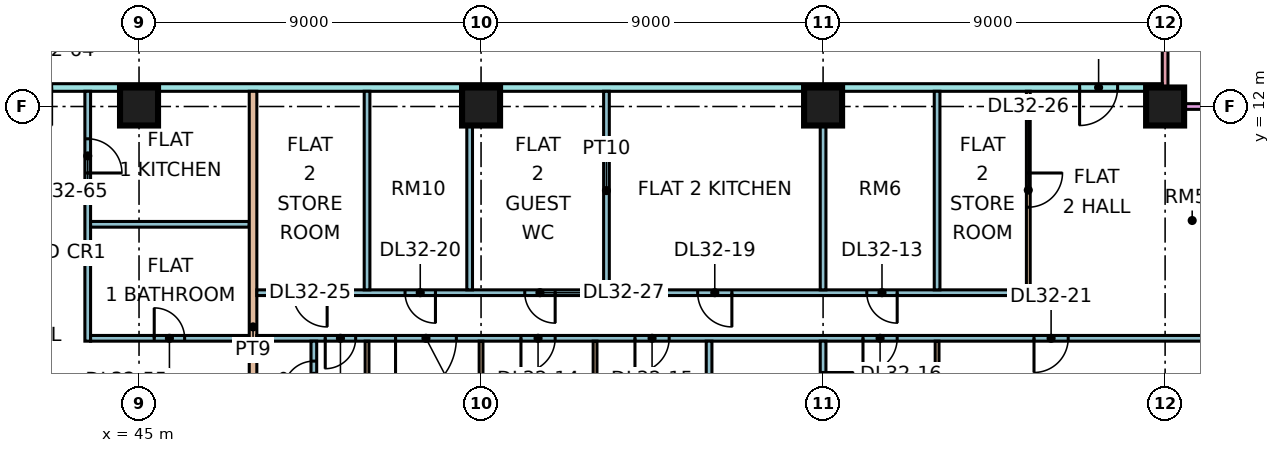
"""IFC4 building model, lengths in metres.
Left out: names, types, materials, properties, quantities, classifications, styles, units other than length and angle.
Written with IfcOpenShell. Run it as: python <this file> out.ifc"""

import sys

from ifc_helpers import new_model, si_unit, direction, frame, frame_2d, origin, origin_2d, place, context, subcontext, project, spatial, rectangle, extrude, element, fill, save


model = new_model("IFC4")
c1 = context("Model", 3, precision=1e-05, world=origin(), true_north=direction((0.0, 1.0)))
c2 = subcontext(c1, "Body", "Model", "MODEL_VIEW")
j1 = project(units=[si_unit("LENGTHUNIT", "METRE"), si_unit("PLANEANGLEUNIT", "RADIAN")], contexts=[c1])
p1 = place(None, origin())
s1 = spatial("IfcSite", under=j1, at=p1, CompositionType="ELEMENT")
p2 = place(p1, origin())
s2 = spatial("IfcBuilding", under=s1, at=p2, CompositionType="ELEMENT")
p3 = place(p2, frame((0.0, 0.0, 136.9)))
s3 = spatial("IfcBuildingStorey", under=s2, at=p3, CompositionType="ELEMENT", Elevation=136.9)
for number, where, z_axis, x_axis in (
    (1, (45.0, 12.0, 0.0), (0.0, 0.0, 1.0), (1.0, 0.0, 0.0)),
    (2, (54.0, 12.0, 0.0), (0.0, 0.0, 1.0), (1.0, 0.0, 0.0)),
    (3, (63.0, 12.0, 0.0), (0.0, 0.0, 1.0), (1.0, 0.0, 0.0)),
    (4, (72.0, 12.0, 0.0), (0.0, 0.0, 1.0), (1.0, 0.0, 0.0)),
):
    element("IfcColumn", number, at=place(p3, frame(where, z_axis=z_axis, x_axis=x_axis)), inside=s3, PredefinedType="COLUMN", context=c2, shape_type="SweptSolid", body=[
        extrude(rectangle(XDim=1.0, YDim=1.0, at=origin_2d()), origin(), (0.0, 0.0, 1.0), 3.75),
    ])
p4 = place(p3, frame((72.0, 12.075, 0.0), z_axis=(0.0, 0.0, 1.0), x_axis=(0.0, 1.0, 0.0)))
e5 = element("IfcWall", 5, at=p4, inside=s3, PredefinedType="SOLIDWALL", context=c2, shape_type="SweptSolid", body=[
    extrude(rectangle(XDim=10.35, YDim=0.15, at=frame_2d((5.175, 0.0))), origin(), (0.0, 0.0, 1.0), 3.3),
])
p5 = place(p4, frame((4.275, 0.0, 1.7)))
e6 = element("IfcOpeningElement", 6, at=p5, cuts=e5, PredefinedType="OPENING", context=c2, shape_type="SweptSolid", body=[
    extrude(rectangle(XDim=1.2, YDim=0.9, at=frame_2d((0.6, 0.45))), frame((0.0, 0.085, 0.0), z_axis=(0.0, -1.0, 0.0), x_axis=(1.0, 0.0, 0.0)), (0.0, 0.0, 1.0), 0.17),
])
p6 = place(p4, frame((7.988, 0.0, 0.45)))
e7 = element("IfcOpeningElement", 7, at=p6, cuts=e5, PredefinedType="OPENING", context=c2, shape_type="SweptSolid", body=[
    extrude(rectangle(XDim=1.8, YDim=2.4, at=frame_2d((0.9, 1.2))), frame((0.0, 0.085, 0.0), z_axis=(0.0, -1.0, 0.0), x_axis=(1.0, 0.0, 0.0)), (0.0, 0.0, 1.0), 0.17),
])
p7 = place(p3, frame((73.5, 12.0, 0.0), z_axis=(0.0, 0.0, 1.0), x_axis=(-1.0, 0.0, 0.0)))
e8 = element("IfcWall", 8, at=p7, inside=s3, PredefinedType="SOLIDWALL", context=c2, shape_type="SweptSolid", body=[
    extrude(rectangle(XDim=1.5, YDim=0.15, at=frame_2d((0.75, 0.0))), origin(), (0.0, 0.0, 1.0), 3.3),
])
p8 = place(p3, frame((40.65, 12.5, 0.0), z_axis=(0.0, 0.0, 1.0), x_axis=(1.0, 0.0, 0.0)))
e9 = element("IfcWall", 9, at=p8, inside=s3, PredefinedType="PARTITIONING", context=c2, shape_type="SweptSolid", body=[
    extrude(rectangle(XDim=31.276, YDim=0.2, at=frame_2d((15.638, 0.0))), origin(), (0.0, 0.0, 1.0), 3.3),
])
p9 = place(p8, frame((29.1, 0.0, 0.0)))
e10 = element("IfcOpeningElement", 10, at=p9, cuts=e9, PredefinedType="OPENING", context=c2, shape_type="SweptSolid", body=[
    extrude(rectangle(XDim=1.0, YDim=2.1, at=frame_2d((0.5, 1.05))), frame((0.0, 0.11, 0.0), z_axis=(0.0, -1.0, 0.0), x_axis=(1.0, 0.0, 0.0)), (0.0, 0.0, 1.0), 0.22),
])
p10 = place(p8, frame((1.05, 0.0, 0.0)))
e11 = element("IfcOpeningElement", 11, at=p10, cuts=e9, PredefinedType="OPENING", context=c2, shape_type="SweptSolid", body=[
    extrude(rectangle(XDim=1.0, YDim=2.1, at=frame_2d((0.5, 1.05))), frame((0.0, 0.11, 0.0), z_axis=(0.0, -1.0, 0.0), x_axis=(1.0, 0.0, 0.0)), (0.0, 0.0, 1.0), 0.22),
])
p11 = place(p3, frame((43.65, 5.825, 0.0), z_axis=(0.0, 0.0, 1.0), x_axis=(0.0, 1.0, 0.0)))
e12 = element("IfcWall", 12, at=p11, inside=s3, PredefinedType="PARTITIONING", context=c2, shape_type="SweptSolid", body=[
    extrude(rectangle(XDim=6.575, YDim=0.15, at=frame_2d((3.288, 0.0))), origin(), (0.0, 0.0, 1.0), 3.3),
])
p12 = place(p11, frame((4.425, 0.0, 0.0)))
e13 = element("IfcOpeningElement", 13, at=p12, cuts=e12, PredefinedType="OPENING", context=c2, shape_type="SweptSolid", body=[
    extrude(rectangle(XDim=0.9, YDim=2.1, at=frame_2d((0.45, 1.05))), frame((0.0, 0.085, 0.0), z_axis=(0.0, -1.0, 0.0), x_axis=(1.0, 0.0, 0.0)), (0.0, 0.0, 1.0), 0.17),
])
p13 = place(p3, frame((43.725, 5.9, 0.0), z_axis=(0.0, 0.0, 1.0), x_axis=(1.0, 0.0, 0.0)))
e14 = element("IfcWall", 14, at=p13, inside=s3, PredefinedType="PARTITIONING", context=c2, shape_type="SweptSolid", body=[
    extrude(rectangle(XDim=4.175, YDim=0.15, at=frame_2d((2.087, 0.0))), origin(), (0.0, 0.0, 1.0), 3.3),
])
p14 = place(p13, frame((1.675, 0.0, 0.0)))
e15 = element("IfcOpeningElement", 15, at=p14, cuts=e14, PredefinedType="OPENING", context=c2, shape_type="SweptSolid", body=[
    extrude(rectangle(XDim=0.8, YDim=2.1, at=frame_2d((0.4, 1.05))), frame((0.0, 0.085, 0.0), z_axis=(0.0, -1.0, 0.0), x_axis=(1.0, 0.0, 0.0)), (0.0, 0.0, 1.0), 0.17),
])
p15 = place(p3, frame((43.725, 8.9, 0.0), z_axis=(0.0, 0.0, 1.0), x_axis=(1.0, 0.0, 0.0)))
e16 = element("IfcWall", 16, at=p15, inside=s3, PredefinedType="PARTITIONING", context=c2, shape_type="SweptSolid", body=[
    extrude(rectangle(XDim=4.175, YDim=0.15, at=frame_2d((2.087, 0.0))), origin(), (0.0, 0.0, 1.0), 3.3),
])
p16 = place(p3, frame((48.0, 0.0, 0.0), z_axis=(0.0, 0.0, 1.0), x_axis=(0.0, 1.0, 0.0)))
e17 = element("IfcWall", 17, at=p16, inside=s3, PredefinedType="PARTITIONING", context=c2, shape_type="SweptSolid", body=[
    extrude(rectangle(XDim=12.4, YDim=0.2, at=frame_2d((6.2, 0.0))), origin(), (0.0, 0.0, 1.0), 3.3),
])
p17 = place(p3, frame((48.1, 5.9, 0.0), z_axis=(0.0, 0.0, 1.0), x_axis=(1.0, 0.0, 0.0)))
e18 = element("IfcWall", 18, at=p17, inside=s3, PredefinedType="PARTITIONING", context=c2, shape_type="SweptSolid", body=[
    extrude(rectangle(XDim=25.25, YDim=0.15, at=frame_2d((12.625, 0.0))), origin(), (0.0, 0.0, 1.0), 3.3),
])
p18 = place(p17, frame((6.95, 0.0, 0.0)))
e19 = element("IfcOpeningElement", 19, at=p18, cuts=e18, PredefinedType="OPENING", context=c2, shape_type="SweptSolid", body=[
    extrude(rectangle(XDim=0.9, YDim=2.1, at=frame_2d((0.45, 1.05))), frame((0.0, 0.085, 0.0), z_axis=(0.0, -1.0, 0.0), x_axis=(1.0, 0.0, 0.0)), (0.0, 0.0, 1.0), 0.17),
])
p19 = place(p17, frame((9.95, 0.0, 0.0)))
e20 = element("IfcOpeningElement", 20, at=p19, cuts=e18, PredefinedType="OPENING", context=c2, shape_type="SweptSolid", body=[
    extrude(rectangle(XDim=0.9, YDim=2.1, at=frame_2d((0.45, 1.05))), frame((0.0, 0.085, 0.0), z_axis=(0.0, -1.0, 0.0), x_axis=(1.0, 0.0, 0.0)), (0.0, 0.0, 1.0), 0.17),
])
p20 = place(p17, frame((15.95, 0.0, 0.0)))
e21 = element("IfcOpeningElement", 21, at=p20, cuts=e18, PredefinedType="OPENING", context=c2, shape_type="SweptSolid", body=[
    extrude(rectangle(XDim=0.9, YDim=2.1, at=frame_2d((0.45, 1.05))), frame((0.0, 0.085, 0.0), z_axis=(0.0, -1.0, 0.0), x_axis=(1.0, 0.0, 0.0)), (0.0, 0.0, 1.0), 0.17),
])
p21 = place(p17, frame((20.45, 0.0, 0.0)))
e22 = element("IfcOpeningElement", 22, at=p21, cuts=e18, PredefinedType="OPENING", context=c2, shape_type="SweptSolid", body=[
    extrude(rectangle(XDim=0.9, YDim=2.1, at=frame_2d((0.45, 1.05))), frame((0.0, 0.085, 0.0), z_axis=(0.0, -1.0, 0.0), x_axis=(1.0, 0.0, 0.0)), (0.0, 0.0, 1.0), 0.17),
])
p22 = place(p17, frame((1.8, 0.0, 0.0)))
e23 = element("IfcOpeningElement", 23, at=p22, cuts=e18, PredefinedType="OPENING", context=c2, shape_type="SweptSolid", body=[
    extrude(rectangle(XDim=0.8, YDim=2.1, at=frame_2d((0.4, 1.05))), frame((0.0, 0.085, 0.0), z_axis=(0.0, -1.0, 0.0), x_axis=(1.0, 0.0, 0.0)), (0.0, 0.0, 1.0), 0.17),
])
p23 = place(p17, frame((3.65, 0.0, 0.0)))
e24 = element("IfcOpeningElement", 24, at=p23, cuts=e18, PredefinedType="OPENING", context=c2, shape_type="SweptSolid", body=[
    extrude(rectangle(XDim=1.6, YDim=2.1, at=frame_2d((0.8, 1.05))), frame((0.0, 0.085, 0.0), z_axis=(0.0, -1.0, 0.0), x_axis=(1.0, 0.0, 0.0)), (0.0, 0.0, 1.0), 0.17),
])
p24 = place(p3, frame((48.1, 7.1, 0.0), z_axis=(0.0, 0.0, 1.0), x_axis=(1.0, 0.0, 0.0)))
e25 = element("IfcWall", 25, at=p24, inside=s3, PredefinedType="PARTITIONING", context=c2, shape_type="SweptSolid", body=[
    extrude(rectangle(XDim=20.35, YDim=0.15, at=frame_2d((10.175, 0.0))), origin(), (0.0, 0.0, 1.0), 3.3),
])
p25 = place(p24, frame((16.05, 0.0, 0.0)))
e26 = element("IfcOpeningElement", 26, at=p25, cuts=e25, PredefinedType="OPENING", context=c2, shape_type="SweptSolid", body=[
    extrude(rectangle(XDim=0.8, YDim=2.1, at=frame_2d((0.4, 1.05))), frame((0.0, 0.085, 0.0), z_axis=(0.0, -1.0, 0.0), x_axis=(1.0, 0.0, 0.0)), (0.0, 0.0, 1.0), 0.17),
])
p26 = place(p24, frame((11.6, 0.0, 0.0)))
e27 = element("IfcOpeningElement", 27, at=p26, cuts=e25, PredefinedType="OPENING", context=c2, shape_type="SweptSolid", body=[
    extrude(rectangle(XDim=0.9, YDim=2.1, at=frame_2d((0.45, 1.05))), frame((0.0, 0.085, 0.0), z_axis=(0.0, -1.0, 0.0), x_axis=(1.0, 0.0, 0.0)), (0.0, 0.0, 1.0), 0.17),
])
p27 = place(p24, frame((3.9, 0.0, 0.0)))
e28 = element("IfcOpeningElement", 28, at=p27, cuts=e25, PredefinedType="OPENING", context=c2, shape_type="SweptSolid", body=[
    extrude(rectangle(XDim=0.8, YDim=2.1, at=frame_2d((0.4, 1.05))), frame((0.0, 0.085, 0.0), z_axis=(0.0, -1.0, 0.0), x_axis=(1.0, 0.0, 0.0)), (0.0, 0.0, 1.0), 0.17),
])
p28 = place(p24, frame((0.95, 0.0, 0.0)))
e29 = element("IfcOpeningElement", 29, at=p28, cuts=e25, PredefinedType="OPENING", context=c2, shape_type="SweptSolid", body=[
    extrude(rectangle(XDim=0.9, YDim=2.1, at=frame_2d((0.45, 1.05))), frame((0.0, 0.085, 0.0), z_axis=(0.0, -1.0, 0.0), x_axis=(1.0, 0.0, 0.0)), (0.0, 0.0, 1.0), 0.17),
])
p29 = place(p24, frame((7.05, 0.0, 0.0)))
e30 = element("IfcOpeningElement", 30, at=p29, cuts=e25, PredefinedType="OPENING", context=c2, shape_type="SweptSolid", body=[
    extrude(rectangle(XDim=0.8, YDim=2.1, at=frame_2d((0.4, 1.05))), frame((0.0, 0.085, 0.0), z_axis=(0.0, -1.0, 0.0), x_axis=(1.0, 0.0, 0.0)), (0.0, 0.0, 1.0), 0.17),
])
p30 = place(p3, frame((49.6, 3.825, 0.0), z_axis=(0.0, 0.0, 1.0), x_axis=(0.0, 1.0, 0.0)))
e31 = element("IfcWall", 31, at=p30, inside=s3, PredefinedType="PARTITIONING", context=c2, shape_type="SweptSolid", body=[
    extrude(rectangle(XDim=2.0, YDim=0.15, at=frame_2d((1.0, 0.0))), origin(), (0.0, 0.0, 1.0), 3.3),
])
p31 = place(p30, frame((0.675, 0.0, 0.0)))
e32 = element("IfcOpeningElement", 32, at=p31, cuts=e31, PredefinedType="OPENING", context=c2, shape_type="SweptSolid", body=[
    extrude(rectangle(XDim=0.8, YDim=2.1, at=frame_2d((0.4, 1.05))), frame((0.0, 0.085, 0.0), z_axis=(0.0, -1.0, 0.0), x_axis=(1.0, 0.0, 0.0)), (0.0, 0.0, 1.0), 0.17),
])
p32 = place(p3, frame((51.0, -1.351, 0.0), z_axis=(0.0, 0.0, 1.0), x_axis=(0.0, 1.0, 0.0)))
e33 = element("IfcWall", 33, at=p32, inside=s3, PredefinedType="PARTITIONING", context=c2, shape_type="SweptSolid", body=[
    extrude(rectangle(XDim=7.176, YDim=0.1, at=frame_2d((3.588, 0.0))), origin(), (0.0, 0.0, 1.0), 3.3),
])
for number, where, z_axis, x_axis in (
    (34, (51.0, 7.175, 0.0), (0.0, 0.0, 1.0), (0.0, 1.0, 0.0)),
    (35, (53.7, 7.175, 0.0), (0.0, 0.0, 1.0), (0.0, 1.0, 0.0)),
):
    element("IfcWall", number, at=place(p3, frame(where, z_axis=z_axis, x_axis=x_axis)), inside=s3, PredefinedType="PARTITIONING", context=c2, shape_type="SweptSolid", body=[
        extrude(rectangle(XDim=5.225, YDim=0.15, at=frame_2d((2.612, 0.0))), origin(), (0.0, 0.0, 1.0), 3.3),
    ])
for number, where, z_axis, x_axis in (
    (36, (54.0, -1.351, 0.0), (0.0, 0.0, 1.0), (0.0, 1.0, 0.0)),
    (37, (57.0, -1.351, 0.0), (0.0, 0.0, 1.0), (0.0, 1.0, 0.0)),
):
    element("IfcWall", number, at=place(p3, frame(where, z_axis=z_axis, x_axis=x_axis)), inside=s3, PredefinedType="PARTITIONING", context=c2, shape_type="SweptSolid", body=[
        extrude(rectangle(XDim=7.176, YDim=0.1, at=frame_2d((3.588, 0.0))), origin(), (0.0, 0.0, 1.0), 3.3),
    ])
p33 = place(p3, frame((57.3, 7.175, 0.0), z_axis=(0.0, 0.0, 1.0), x_axis=(0.0, 1.0, 0.0)))
e38 = element("IfcWall", 38, at=p33, inside=s3, PredefinedType="PARTITIONING", context=c2, shape_type="SweptSolid", body=[
    extrude(rectangle(XDim=5.225, YDim=0.15, at=frame_2d((2.612, 0.0))), origin(), (0.0, 0.0, 1.0), 3.3),
])
p34 = place(p3, frame((60.0, 0.0, 0.0), z_axis=(0.0, 0.0, 1.0), x_axis=(0.0, 1.0, 0.0)))
e39 = element("IfcWall", 39, at=p34, inside=s3, PredefinedType="PARTITIONING", context=c2, shape_type="SweptSolid", body=[
    extrude(rectangle(XDim=5.825, YDim=0.15, at=frame_2d((2.913, 0.0))), origin(), (0.0, 0.0, 1.0), 3.3),
])
p35 = place(p3, frame((63.0, 3.375, 0.0), z_axis=(0.0, 0.0, 1.0), x_axis=(0.0, 1.0, 0.0)))
e40 = element("IfcWall", 40, at=p35, inside=s3, PredefinedType="PARTITIONING", context=c2, shape_type="SweptSolid", body=[
    extrude(rectangle(XDim=2.45, YDim=0.15, at=frame_2d((1.225, 0.0))), origin(), (0.0, 0.0, 1.0), 3.3),
])
p36 = place(p35, frame((0.825, 0.0, 0.0)))
e41 = element("IfcOpeningElement", 41, at=p36, cuts=e40, PredefinedType="OPENING", context=c2, shape_type="SweptSolid", body=[
    extrude(rectangle(XDim=0.8, YDim=2.1, at=frame_2d((0.4, 1.05))), frame((0.0, 0.085, 0.0), z_axis=(0.0, -1.0, 0.0), x_axis=(1.0, 0.0, 0.0)), (0.0, 0.0, 1.0), 0.17),
])
p37 = place(p3, frame((63.0, 7.175, 0.0), z_axis=(0.0, 0.0, 1.0), x_axis=(0.0, 1.0, 0.0)))
e42 = element("IfcWall", 42, at=p37, inside=s3, PredefinedType="PARTITIONING", context=c2, shape_type="SweptSolid", body=[
    extrude(rectangle(XDim=5.225, YDim=0.15, at=frame_2d((2.612, 0.0))), origin(), (0.0, 0.0, 1.0), 3.3),
])
p38 = place(p3, frame((66.0, 0.074, 0.0), z_axis=(0.0, 0.0, 1.0), x_axis=(0.0, 1.0, 0.0)))
e43 = element("IfcWall", 43, at=p38, inside=s3, PredefinedType="PARTITIONING", context=c2, shape_type="SweptSolid", body=[
    extrude(rectangle(XDim=5.751, YDim=0.1, at=frame_2d((2.875, 0.0))), origin(), (0.0, 0.0, 1.0), 3.3),
])
p39 = place(p3, frame((66.0, 7.175, 0.0), z_axis=(0.0, 0.0, 1.0), x_axis=(0.0, 1.0, 0.0)))
e44 = element("IfcWall", 44, at=p39, inside=s3, PredefinedType="PARTITIONING", context=c2, shape_type="SweptSolid", body=[
    extrude(rectangle(XDim=5.225, YDim=0.15, at=frame_2d((2.612, 0.0))), origin(), (0.0, 0.0, 1.0), 3.3),
])
p40 = place(p3, frame((68.4, 7.175, 0.0), z_axis=(0.0, 0.0, 1.0), x_axis=(0.0, 1.0, 0.0)))
e45 = element("IfcWall", 45, at=p40, inside=s3, PredefinedType="PARTITIONING", context=c2, shape_type="SweptSolid", body=[
    extrude(rectangle(XDim=5.225, YDim=0.1, at=frame_2d((2.612, 0.0))), origin(), (0.0, 0.0, 1.0), 3.3),
])
p41 = place(p40, frame((2.175, 0.0, 0.0)))
e46 = element("IfcOpeningElement", 46, at=p41, cuts=e45, PredefinedType="OPENING", context=c2, shape_type="SweptSolid", body=[
    extrude(rectangle(XDim=0.9, YDim=2.1, at=frame_2d((0.45, 1.05))), frame((0.0, 0.06, 0.0), z_axis=(0.0, -1.0, 0.0), x_axis=(1.0, 0.0, 0.0)), (0.0, 0.0, 1.0), 0.12),
])
p42 = place(p25, origin())
e47 = element("IfcDoor", 47, at=p42, inside=s3, OperationType="SINGLE_SWING_RIGHT", PredefinedType="DOOR", context=c2, shape_type="SweptSolid", body=[
    extrude(rectangle(XDim=0.8, YDim=2.1, at=frame_2d((0.4, 1.05))), frame((0.0, 0.025, 0.0), z_axis=(0.0, -1.0, 0.0), x_axis=(1.0, 0.0, 0.0)), (0.0, 0.0, 1.0), 0.05),
])
fill(e26, e47)
p43 = place(p18, frame((0.9, 0.0, 0.0), z_axis=(0.0, 0.0, 1.0), x_axis=(-1.0, 0.0, 0.0)))
e48 = element("IfcDoor", 48, at=p43, inside=s3, OperationType="SINGLE_SWING_LEFT", PredefinedType="DOOR", context=c2, shape_type="SweptSolid", body=[
    extrude(rectangle(XDim=0.9, YDim=2.1, at=frame_2d((0.45, 1.05))), frame((0.0, 0.025, 0.0), z_axis=(0.0, -1.0, 0.0), x_axis=(1.0, 0.0, 0.0)), (0.0, 0.0, 1.0), 0.05),
])
fill(e19, e48)
p44 = place(p19, frame((0.9, 0.0, 0.0), z_axis=(0.0, 0.0, 1.0), x_axis=(-1.0, 0.0, 0.0)))
e49 = element("IfcDoor", 49, at=p44, inside=s3, OperationType="SINGLE_SWING_LEFT", PredefinedType="DOOR", context=c2, shape_type="SweptSolid", body=[
    extrude(rectangle(XDim=0.9, YDim=2.1, at=frame_2d((0.45, 1.05))), frame((0.0, 0.025, 0.0), z_axis=(0.0, -1.0, 0.0), x_axis=(1.0, 0.0, 0.0)), (0.0, 0.0, 1.0), 0.05),
])
fill(e20, e49)
p45 = place(p20, frame((0.9, 0.0, 0.0), z_axis=(0.0, 0.0, 1.0), x_axis=(-1.0, 0.0, 0.0)))
e50 = element("IfcDoor", 50, at=p45, inside=s3, OperationType="SINGLE_SWING_LEFT", PredefinedType="DOOR", context=c2, shape_type="SweptSolid", body=[
    extrude(rectangle(XDim=0.9, YDim=2.1, at=frame_2d((0.45, 1.05))), frame((0.0, 0.025, 0.0), z_axis=(0.0, -1.0, 0.0), x_axis=(1.0, 0.0, 0.0)), (0.0, 0.0, 1.0), 0.05),
])
fill(e21, e50)
p46 = place(p36, origin())
e51 = element("IfcDoor", 51, at=p46, inside=s3, OperationType="SINGLE_SWING_RIGHT", PredefinedType="DOOR", context=c2, shape_type="SweptSolid", body=[
    extrude(rectangle(XDim=0.8, YDim=2.1, at=frame_2d((0.4, 1.05))), frame((0.0, 0.025, 0.0), z_axis=(0.0, -1.0, 0.0), x_axis=(1.0, 0.0, 0.0)), (0.0, 0.0, 1.0), 0.05),
])
fill(e41, e51)
p47 = place(p9, frame((1.0, 0.0, 0.0), z_axis=(0.0, 0.0, 1.0), x_axis=(-1.0, 0.0, 0.0)))
e52 = element("IfcDoor", 52, at=p47, inside=s3, OperationType="SINGLE_SWING_LEFT", PredefinedType="DOOR", context=c2, shape_type="SweptSolid", body=[
    extrude(rectangle(XDim=1.0, YDim=2.1, at=frame_2d((0.5, 1.05))), frame((0.0, 0.025, 0.0), z_axis=(0.0, -1.0, 0.0), x_axis=(1.0, 0.0, 0.0)), (0.0, 0.0, 1.0), 0.05),
])
fill(e10, e52)
p48 = place(p26, origin())
e53 = element("IfcDoor", 53, at=p48, inside=s3, OperationType="SINGLE_SWING_RIGHT", PredefinedType="DOOR", context=c2, shape_type="SweptSolid", body=[
    extrude(rectangle(XDim=0.9, YDim=2.1, at=frame_2d((0.45, 1.05))), frame((0.0, 0.025, 0.0), z_axis=(0.0, -1.0, 0.0), x_axis=(1.0, 0.0, 0.0)), (0.0, 0.0, 1.0), 0.05),
])
fill(e27, e53)
p49 = place(p27, origin())
e54 = element("IfcDoor", 54, at=p49, inside=s3, OperationType="SINGLE_SWING_RIGHT", PredefinedType="DOOR", context=c2, shape_type="SweptSolid", body=[
    extrude(rectangle(XDim=0.8, YDim=2.1, at=frame_2d((0.4, 1.05))), frame((0.0, 0.025, 0.0), z_axis=(0.0, -1.0, 0.0), x_axis=(1.0, 0.0, 0.0)), (0.0, 0.0, 1.0), 0.05),
])
fill(e28, e54)
p50 = place(p21, frame((0.9, 0.0, 0.0), z_axis=(0.0, 0.0, 1.0), x_axis=(-1.0, 0.0, 0.0)))
e55 = element("IfcDoor", 55, at=p50, inside=s3, OperationType="SINGLE_SWING_LEFT", PredefinedType="DOOR", context=c2, shape_type="SweptSolid", body=[
    extrude(rectangle(XDim=0.9, YDim=2.1, at=frame_2d((0.45, 1.05))), frame((0.0, 0.025, 0.0), z_axis=(0.0, -1.0, 0.0), x_axis=(1.0, 0.0, 0.0)), (0.0, 0.0, 1.0), 0.05),
])
fill(e22, e55)
p51 = place(p22, frame((0.8, 0.0, 0.0), z_axis=(0.0, 0.0, 1.0), x_axis=(-1.0, 0.0, 0.0)))
e56 = element("IfcDoor", 56, at=p51, inside=s3, OperationType="SINGLE_SWING_LEFT", PredefinedType="DOOR", context=c2, shape_type="SweptSolid", body=[
    extrude(rectangle(XDim=0.8, YDim=2.1, at=frame_2d((0.4, 1.05))), frame((0.0, 0.025, 0.0), z_axis=(0.0, -1.0, 0.0), x_axis=(1.0, 0.0, 0.0)), (0.0, 0.0, 1.0), 0.05),
])
fill(e23, e56)
p52 = place(p31, origin())
e57 = element("IfcDoor", 57, at=p52, inside=s3, OperationType="SINGLE_SWING_LEFT", PredefinedType="DOOR", context=c2, shape_type="SweptSolid", body=[
    extrude(rectangle(XDim=0.8, YDim=2.1, at=frame_2d((0.4, 1.05))), frame((0.0, 0.025, 0.0), z_axis=(0.0, -1.0, 0.0), x_axis=(1.0, 0.0, 0.0)), (0.0, 0.0, 1.0), 0.05),
])
fill(e32, e57)
p53 = place(p23, frame((1.6, 0.0, 0.0), z_axis=(0.0, 0.0, 1.0), x_axis=(-1.0, 0.0, 0.0)))
e58 = element("IfcDoor", 58, at=p53, inside=s3, OperationType="DOUBLE_DOOR_SINGLE_SWING", PredefinedType="DOOR", context=c2, shape_type="SweptSolid", body=[
    extrude(rectangle(XDim=1.6, YDim=2.1, at=frame_2d((0.8, 1.05))), frame((0.0, 0.025, 0.0), z_axis=(0.0, -1.0, 0.0), x_axis=(1.0, 0.0, 0.0)), (0.0, 0.0, 1.0), 0.05),
])
fill(e24, e58)
p54 = place(p28, origin())
e59 = element("IfcDoor", 59, at=p54, inside=s3, OperationType="SINGLE_SWING_RIGHT", PredefinedType="DOOR", context=c2, shape_type="SweptSolid", body=[
    extrude(rectangle(XDim=0.9, YDim=2.1, at=frame_2d((0.45, 1.05))), frame((0.0, 0.025, 0.0), z_axis=(0.0, -1.0, 0.0), x_axis=(1.0, 0.0, 0.0)), (0.0, 0.0, 1.0), 0.05),
])
fill(e29, e59)
p55 = place(p41, origin())
e60 = element("IfcDoor", 60, at=p55, inside=s3, OperationType="SINGLE_SWING_RIGHT", PredefinedType="DOOR", context=c2, shape_type="SweptSolid", body=[
    extrude(rectangle(XDim=0.9, YDim=2.1, at=frame_2d((0.45, 1.05))), frame((0.0, 0.025, 0.0), z_axis=(0.0, -1.0, 0.0), x_axis=(1.0, 0.0, 0.0)), (0.0, 0.0, 1.0), 0.05),
])
fill(e46, e60)
p56 = place(p29, origin())
e61 = element("IfcDoor", 61, at=p56, inside=s3, OperationType="SINGLE_SWING_RIGHT", PredefinedType="DOOR", context=c2, shape_type="SweptSolid", body=[
    extrude(rectangle(XDim=0.8, YDim=2.1, at=frame_2d((0.4, 1.05))), frame((0.0, 0.025, 0.0), z_axis=(0.0, -1.0, 0.0), x_axis=(1.0, 0.0, 0.0)), (0.0, 0.0, 1.0), 0.05),
])
fill(e30, e61)
p57 = place(p14, origin())
e62 = element("IfcDoor", 62, at=p57, inside=s3, OperationType="SINGLE_SWING_LEFT", PredefinedType="DOOR", context=c2, shape_type="SweptSolid", body=[
    extrude(rectangle(XDim=0.8, YDim=2.1, at=frame_2d((0.4, 1.05))), frame((0.0, 0.025, 0.0), z_axis=(0.0, -1.0, 0.0), x_axis=(1.0, 0.0, 0.0)), (0.0, 0.0, 1.0), 0.05),
])
fill(e15, e62)
p58 = place(p12, frame((0.9, 0.0, 0.0), z_axis=(0.0, 0.0, 1.0), x_axis=(-1.0, 0.0, 0.0)))
e63 = element("IfcDoor", 63, at=p58, inside=s3, OperationType="SINGLE_SWING_LEFT", PredefinedType="DOOR", context=c2, shape_type="SweptSolid", body=[
    extrude(rectangle(XDim=0.9, YDim=2.1, at=frame_2d((0.45, 1.05))), frame((0.0, 0.025, 0.0), z_axis=(0.0, -1.0, 0.0), x_axis=(1.0, 0.0, 0.0)), (0.0, 0.0, 1.0), 0.05),
])
fill(e13, e63)
save(model, sys.argv[1])
